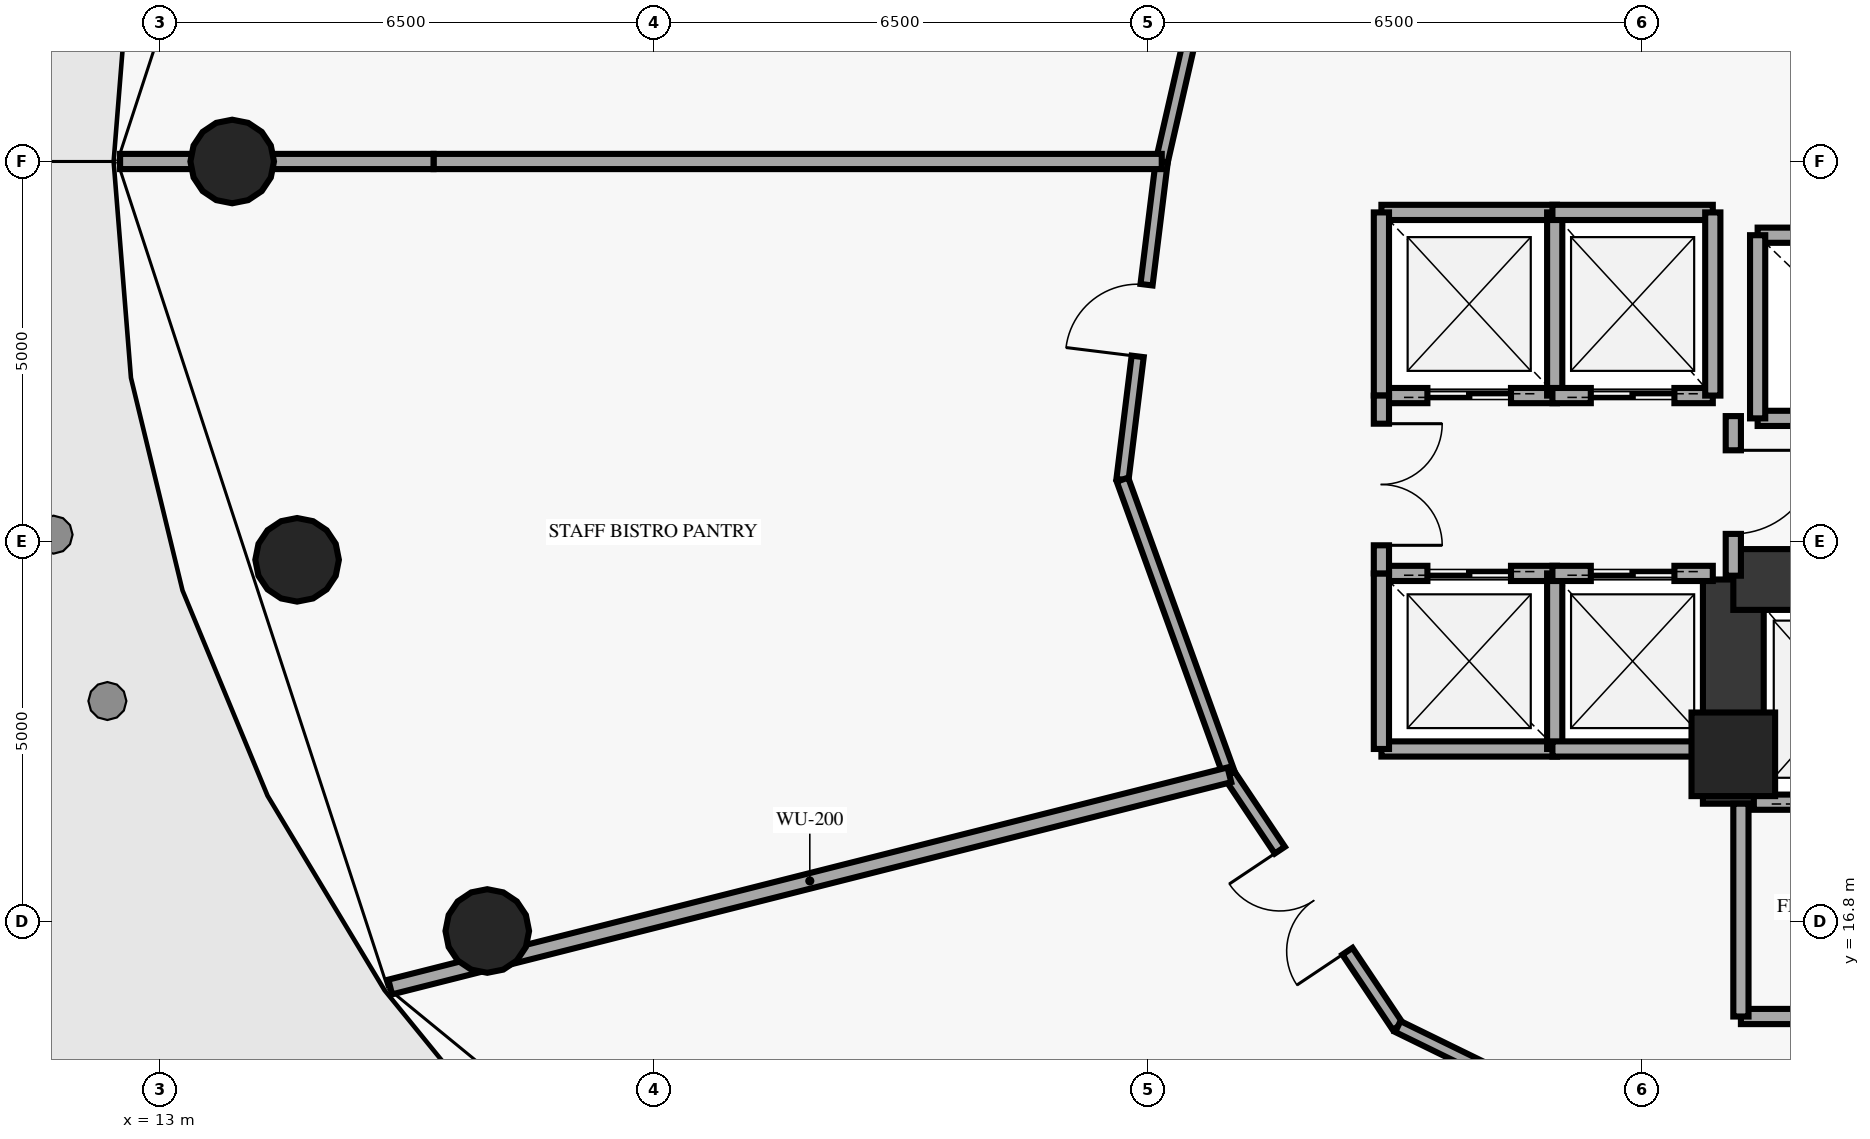
"""IFC4 building model, lengths in metres.
Left out: names, types, materials, properties, quantities, classifications, styles, units other than length and angle.
Written with IfcOpenShell. Run it as: python <this file> out.ifc"""

import sys

from ifc_helpers import new_model, si_unit, direction, frame, frame_2d, origin, origin_2d, place, context, subcontext, project, spatial, rectangle, circle, extrude, element, fill, save


model = new_model("IFC4")
c1 = context("Model", 3, precision=1e-05, world=origin(), true_north=direction((0.0, 1.0)))
c2 = subcontext(c1, "Body", "Model", "MODEL_VIEW")
j1 = project(units=[si_unit("LENGTHUNIT", "METRE"), si_unit("PLANEANGLEUNIT", "RADIAN")], contexts=[c1])
p1 = place(None, origin())
s1 = spatial("IfcSite", under=j1, at=p1, CompositionType="ELEMENT")
p2 = place(p1, origin())
s2 = spatial("IfcBuilding", under=s1, at=p2, CompositionType="ELEMENT")
p3 = place(p2, frame((0.0, 0.0, 21.0)))
s3 = spatial("IfcBuildingStorey", under=s2, at=p3, CompositionType="ELEMENT", Elevation=21.0)
p4 = place(p3, frame((33.7, 19.0, 0.0), z_axis=(0.0, 0.0, 1.0), x_axis=(1.0, 0.0, 0.0)))
e1 = element("IfcColumn", 1, at=p4, inside=s3, PredefinedType="PILASTER", context=c2, shape_type="SweptSolid", body=[
    extrude(rectangle(XDim=1.1, YDim=1.1, at=origin_2d()), origin(), (0.0, 0.0, 1.0), 3.79),
])
p5 = place(p3, frame((13.95, 26.8, 0.0), z_axis=(0.0, 0.0, 1.0), x_axis=(1.0, 0.0, 0.0)))
e2 = element("IfcColumn", 2, at=p5, inside=s3, PredefinedType="COLUMN", context=c2, shape_type="SweptSolid", body=[
    extrude(circle(Radius=0.55, at=origin_2d()), origin(), (0.0, 0.0, 1.0), 3.79),
])
for number, where, z_axis, x_axis in (
    (3, (14.804, 21.559, -0.26), (0.0, 0.0, 1.0), (1.0, 0.0, 0.0)),
    (4, (17.306, 16.675, -0.26), (0.0, 0.0, 1.0), (1.0, 0.0, 0.0)),
):
    element("IfcColumn", number, at=place(p3, frame(where, z_axis=z_axis, x_axis=x_axis)), inside=s3, PredefinedType="COLUMN", context=c2, shape_type="SweptSolid", body=[
        extrude(circle(Radius=0.55, at=origin_2d()), origin(), (0.0, 0.0, 1.0), 4.05),
    ])
p6 = place(p3, frame((33.7, 18.35, 0.0), z_axis=(0.0, 0.0, 1.0), x_axis=(0.0, 1.0, 0.0)))
e5 = element("IfcWall", 5, at=p6, inside=s3, PredefinedType="SHEAR", context=c2, shape_type="SweptSolid", body=[
    extrude(rectangle(XDim=2.95, YDim=0.8, at=frame_2d((1.475, 0.0))), origin(), (0.0, 0.0, 1.0), 3.79),
])
p7 = place(p3, frame((33.7, 21.3, 0.0), z_axis=(0.0, 0.0, 1.0), x_axis=(1.0, 0.0, 0.0)))
e6 = element("IfcWall", 6, at=p7, inside=s3, PredefinedType="SHEAR", context=c2, shape_type="SweptSolid", body=[
    extrude(rectangle(XDim=7.55, YDim=0.8, at=frame_2d((3.775, 0.0))), origin(), (0.0, 0.0, 1.0), 3.79),
])
p8 = place(p3, frame((10.811, 15.225, 0.0), z_axis=(0.0, 0.0, 1.0), x_axis=(0.733372632091, -0.679826876859, 0.0)))
e7 = element("IfcWall", 7, at=p8, inside=s3, PredefinedType="PARAPET", context=c2, shape_type="SweptSolid", body=[
    extrude(rectangle(XDim=7.053, YDim=0.24, at=frame_2d((3.527, 0.0))), origin(), (0.0, 0.0, 1.0), 1.15),
])
p9 = place(p3, frame((29.07, 23.72, 0.0), z_axis=(0.0, 0.0, 1.0), x_axis=(1.0, 0.0, 0.0)))
e8 = element("IfcWall", 8, at=p9, inside=s3, PredefinedType="SOLIDWALL", context=c2, shape_type="SweptSolid", body=[
    extrude(rectangle(XDim=2.31, YDim=0.2, at=frame_2d((1.155, 0.0))), origin(), (0.0, 0.0, 1.0), 3.79),
])
p10 = place(p9, frame((0.605, 0.0, 0.0)))
e9 = element("IfcOpeningElement", 9, at=p10, cuts=e8, PredefinedType="OPENING", context=c2, shape_type="SweptSolid", body=[
    extrude(rectangle(XDim=1.1, YDim=2.15, at=frame_2d((0.55, 1.075))), frame((0.0, 0.11, 0.0), z_axis=(0.0, -1.0, 0.0), x_axis=(1.0, 0.0, 0.0)), (0.0, 0.0, 1.0), 0.22),
])
p11 = place(p3, frame((29.07, 26.13, 0.0), z_axis=(0.0, 0.0, 1.0), x_axis=(1.0, 0.0, 0.0)))
e10 = element("IfcWall", 10, at=p11, inside=s3, PredefinedType="SOLIDWALL", context=c2, shape_type="SweptSolid", body=[
    extrude(rectangle(XDim=2.31, YDim=0.2, at=frame_2d((1.155, 0.0))), origin(), (0.0, 0.0, 1.0), 3.79),
])
for number, where, z_axis, x_axis in (
    (11, (29.07, 23.72, 0.0), (0.0, 0.0, 1.0), (0.0, 1.0, 0.0)),
    (12, (31.35, 23.72, 0.0), (0.0, 0.0, 1.0), (0.0, 1.0, 0.0)),
):
    element("IfcWall", number, at=place(p3, frame(where, z_axis=z_axis, x_axis=x_axis)), inside=s3, PredefinedType="SOLIDWALL", context=c2, shape_type="SweptSolid", body=[
        extrude(rectangle(XDim=2.41, YDim=0.2, at=frame_2d((1.205, 0.0))), origin(), (0.0, 0.0, 1.0), 3.79),
    ])
p12 = place(p3, frame((31.32, 23.72, 0.0), z_axis=(0.0, 0.0, 1.0), x_axis=(1.0, 0.0, 0.0)))
e13 = element("IfcWall", 13, at=p12, inside=s3, PredefinedType="SOLIDWALL", context=c2, shape_type="SweptSolid", body=[
    extrude(rectangle(XDim=2.11, YDim=0.2, at=frame_2d((1.055, 0.0))), origin(), (0.0, 0.0, 1.0), 3.79),
])
p13 = place(p12, frame((0.505, 0.0, 0.0)))
e14 = element("IfcOpeningElement", 14, at=p13, cuts=e13, PredefinedType="OPENING", context=c2, shape_type="SweptSolid", body=[
    extrude(rectangle(XDim=1.1, YDim=2.15, at=frame_2d((0.55, 1.075))), frame((0.0, 0.11, 0.0), z_axis=(0.0, -1.0, 0.0), x_axis=(1.0, 0.0, 0.0)), (0.0, 0.0, 1.0), 0.22),
])
p14 = place(p3, frame((31.32, 26.13, 0.0), z_axis=(0.0, 0.0, 1.0), x_axis=(1.0, 0.0, 0.0)))
e15 = element("IfcWall", 15, at=p14, inside=s3, PredefinedType="SOLIDWALL", context=c2, shape_type="SweptSolid", body=[
    extrude(rectangle(XDim=2.11, YDim=0.2, at=frame_2d((1.055, 0.0))), origin(), (0.0, 0.0, 1.0), 3.79),
])
p15 = place(p3, frame((33.43, 23.72, 0.0), z_axis=(0.0, 0.0, 1.0), x_axis=(0.0, 1.0, 0.0)))
e16 = element("IfcWall", 16, at=p15, inside=s3, PredefinedType="SOLIDWALL", context=c2, shape_type="SweptSolid", body=[
    extrude(rectangle(XDim=2.41, YDim=0.2, at=frame_2d((1.205, 0.0))), origin(), (0.0, 0.0, 1.0), 3.79),
])
p16 = place(p3, frame((29.07, 19.07, 0.0), z_axis=(0.0, 0.0, 1.0), x_axis=(1.0, 0.0, 0.0)))
e17 = element("IfcWall", 17, at=p16, inside=s3, PredefinedType="SOLIDWALL", context=c2, shape_type="SweptSolid", body=[
    extrude(rectangle(XDim=2.31, YDim=0.2, at=frame_2d((1.155, 0.0))), origin(), (0.0, 0.0, 1.0), 3.79),
])
p17 = place(p3, frame((29.07, 21.38, 0.0), z_axis=(0.0, 0.0, 1.0), x_axis=(1.0, 0.0, 0.0)))
e18 = element("IfcWall", 18, at=p17, inside=s3, PredefinedType="SOLIDWALL", context=c2, shape_type="SweptSolid", body=[
    extrude(rectangle(XDim=2.31, YDim=0.2, at=frame_2d((1.155, 0.0))), origin(), (0.0, 0.0, 1.0), 3.79),
])
p18 = place(p17, frame((0.605, 0.0, 0.0)))
e19 = element("IfcOpeningElement", 19, at=p18, cuts=e18, PredefinedType="OPENING", context=c2, shape_type="SweptSolid", body=[
    extrude(rectangle(XDim=1.1, YDim=2.15, at=frame_2d((0.55, 1.075))), frame((0.0, 0.11, 0.0), z_axis=(0.0, -1.0, 0.0), x_axis=(1.0, 0.0, 0.0)), (0.0, 0.0, 1.0), 0.22),
])
for number, where, z_axis, x_axis in (
    (20, (29.07, 19.07, 0.0), (0.0, 0.0, 1.0), (0.0, 1.0, 0.0)),
    (21, (31.35, 19.07, 0.0), (0.0, 0.0, 1.0), (0.0, 1.0, 0.0)),
):
    element("IfcWall", number, at=place(p3, frame(where, z_axis=z_axis, x_axis=x_axis)), inside=s3, PredefinedType="SOLIDWALL", context=c2, shape_type="SweptSolid", body=[
        extrude(rectangle(XDim=2.31, YDim=0.2, at=frame_2d((1.155, 0.0))), origin(), (0.0, 0.0, 1.0), 3.79),
    ])
p19 = place(p3, frame((31.32, 19.07, 0.0), z_axis=(0.0, 0.0, 1.0), x_axis=(1.0, 0.0, 0.0)))
e22 = element("IfcWall", 22, at=p19, inside=s3, PredefinedType="SOLIDWALL", context=c2, shape_type="SweptSolid", body=[
    extrude(rectangle(XDim=2.11, YDim=0.2, at=frame_2d((1.055, 0.0))), origin(), (0.0, 0.0, 1.0), 3.79),
])
p20 = place(p3, frame((31.32, 21.38, 0.0), z_axis=(0.0, 0.0, 1.0), x_axis=(1.0, 0.0, 0.0)))
e23 = element("IfcWall", 23, at=p20, inside=s3, PredefinedType="SOLIDWALL", context=c2, shape_type="SweptSolid", body=[
    extrude(rectangle(XDim=2.11, YDim=0.2, at=frame_2d((1.055, 0.0))), origin(), (0.0, 0.0, 1.0), 3.79),
])
p21 = place(p20, frame((0.505, 0.0, 0.0)))
e24 = element("IfcOpeningElement", 24, at=p21, cuts=e23, PredefinedType="OPENING", context=c2, shape_type="SweptSolid", body=[
    extrude(rectangle(XDim=1.1, YDim=2.15, at=frame_2d((0.55, 1.075))), frame((0.0, 0.11, 0.0), z_axis=(0.0, -1.0, 0.0), x_axis=(1.0, 0.0, 0.0)), (0.0, 0.0, 1.0), 0.22),
])
for number, where, z_axis, x_axis in (
    (25, (34.02, 23.42, 0.0), (0.0, 0.0, 1.0), (1.0, 0.0, 0.0)),
    (26, (34.02, 25.83, 0.0), (0.0, 0.0, 1.0), (1.0, 0.0, 0.0)),
):
    element("IfcWall", number, at=place(p3, frame(where, z_axis=z_axis, x_axis=x_axis)), inside=s3, PredefinedType="SOLIDWALL", context=c2, shape_type="SweptSolid", body=[
        extrude(rectangle(XDim=2.5, YDim=0.2, at=frame_2d((1.25, 0.0))), origin(), (0.0, 0.0, 1.0), 3.79),
    ])
p22 = place(p3, frame((34.02, 23.42, 0.0), z_axis=(0.0, 0.0, 1.0), x_axis=(0.0, 1.0, 0.0)))
e27 = element("IfcWall", 27, at=p22, inside=s3, PredefinedType="SOLIDWALL", context=c2, shape_type="SweptSolid", body=[
    extrude(rectangle(XDim=2.41, YDim=0.2, at=frame_2d((1.205, 0.0))), origin(), (0.0, 0.0, 1.0), 3.79),
])
p23 = place(p3, frame((33.97, 18.37, 0.0), z_axis=(0.0, 0.0, 1.0), x_axis=(1.0, 0.0, 0.0)))
e28 = element("IfcWall", 28, at=p23, inside=s3, PredefinedType="SOLIDWALL", context=c2, shape_type="SweptSolid", body=[
    extrude(rectangle(XDim=2.36, YDim=0.2, at=frame_2d((1.18, 0.0))), origin(), (0.0, 0.0, 1.0), 3.79),
])
p24 = place(p23, frame((0.555, 0.0, 0.0)))
e29 = element("IfcOpeningElement", 29, at=p24, cuts=e28, PredefinedType="OPENING", context=c2, shape_type="SweptSolid", body=[
    extrude(rectangle(XDim=1.25, YDim=2.2, at=frame_2d((0.625, 1.1))), frame((0.0, 0.11, 0.0), z_axis=(0.0, -1.0, 0.0), x_axis=(1.0, 0.0, 0.0)), (0.0, 0.0, 1.0), 0.22),
])
p25 = place(p3, frame((29.07, 21.38, 0.0), z_axis=(0.0, 0.0, 1.0), x_axis=(0.0, 1.0, 0.0)))
e30 = element("IfcWall", 30, at=p25, inside=s3, PredefinedType="SOLIDWALL", context=c2, shape_type="SweptSolid", body=[
    extrude(rectangle(XDim=2.34, YDim=0.2, at=frame_2d((1.17, 0.0))), origin(), (0.0, 0.0, 1.0), 3.79),
])
p26 = place(p25, frame((0.37, 0.0, 0.0)))
e31 = element("IfcOpeningElement", 31, at=p26, cuts=e30, PredefinedType="OPENING", context=c2, shape_type="SweptSolid", body=[
    extrude(rectangle(XDim=1.6, YDim=2.2, at=frame_2d((0.8, 1.1))), frame((0.0, 0.11, 0.0), z_axis=(0.0, -1.0, 0.0), x_axis=(1.0, 0.0, 0.0)), (0.0, 0.0, 1.0), 0.22),
])
p27 = place(p3, frame((33.7, 21.35, 0.0), z_axis=(0.0, 0.0, 1.0), x_axis=(0.0, 1.0, 0.0)))
e32 = element("IfcWall", 32, at=p27, inside=s3, PredefinedType="SOLIDWALL", context=c2, shape_type="SweptSolid", body=[
    extrude(rectangle(XDim=2.1, YDim=0.2, at=frame_2d((1.05, 0.0))), origin(), (0.0, 0.0, 1.0), 3.01),
])
p28 = place(p27, frame((0.55, 0.0, 0.0)))
e33 = element("IfcOpeningElement", 33, at=p28, cuts=e32, PredefinedType="OPENING", context=c2, shape_type="SweptSolid", body=[
    extrude(rectangle(XDim=1.1, YDim=2.15, at=frame_2d((0.55, 1.075))), frame((0.0, 0.11, 0.0), z_axis=(0.0, -1.0, 0.0), x_axis=(1.0, 0.0, 0.0)), (0.0, 0.0, 1.0), 0.22),
])
p29 = place(p3, frame((33.8, 15.55, 0.0), z_axis=(0.0, 0.0, 1.0), x_axis=(1.0, 0.0, 0.0)))
e34 = element("IfcWall", 34, at=p29, inside=s3, PredefinedType="SOLIDWALL", context=c2, shape_type="SweptSolid", body=[
    extrude(rectangle(XDim=7.55, YDim=0.2, at=frame_2d((3.775, 0.0))), origin(), (0.0, 0.0, 1.0), 3.79),
])
p30 = place(p3, frame((33.8, 15.55, 0.0), z_axis=(0.0, 0.0, 1.0), x_axis=(0.0, 1.0, 0.0)))
e35 = element("IfcWall", 35, at=p30, inside=s3, PredefinedType="SOLIDWALL", context=c2, shape_type="SweptSolid", body=[
    extrude(rectangle(XDim=2.8, YDim=0.2, at=frame_2d((1.4, 0.0))), origin(), (0.0, 0.0, 1.0), 3.79),
])
p31 = place(p3, frame((27.898, 34.31, 0.0), z_axis=(0.0, 0.0, 1.0), x_axis=(-0.223002916051, -0.974817777553, 0.0)))
e36 = element("IfcWall", 36, at=p31, inside=s3, PredefinedType="PARTITIONING", context=c2, shape_type="SweptSolid", body=[
    extrude(rectangle(XDim=7.704, YDim=0.16, at=frame_2d((3.852, 0.0))), origin(), (0.0, 0.0, 1.0), 3.79),
])
p32 = place(p3, frame((25.663, 22.614, 0.0), z_axis=(0.0, 0.0, 1.0), x_axis=(0.122538537921, 0.992463755874, 0.0)))
e37 = element("IfcWall", 37, at=p32, inside=s3, PredefinedType="PARTITIONING", context=c2, shape_type="SweptSolid", body=[
    extrude(rectangle(XDim=4.218, YDim=0.16, at=frame_2d((2.109, 0.0))), origin(), (0.0, 0.0, 1.0), 3.79),
])
p33 = place(p32, frame((1.634, 0.0, 0.0)))
e38 = element("IfcOpeningElement", 38, at=p33, cuts=e37, PredefinedType="OPENING", context=c2, shape_type="SweptSolid", body=[
    extrude(rectangle(XDim=0.95, YDim=2.15, at=frame_2d((0.475, 1.075))), frame((0.0, 0.09, 0.0), z_axis=(0.0, -1.0, 0.0), x_axis=(1.0, 0.0, 0.0)), (0.0, 0.0, 1.0), 0.18),
])
p34 = place(p3, frame((25.663, 22.614, 0.0), z_axis=(0.0, 0.0, 1.0), x_axis=(0.34058972089, -0.940212019719, 0.0)))
e39 = element("IfcWall", 39, at=p34, inside=s3, PredefinedType="PARTITIONING", context=c2, shape_type="SweptSolid", body=[
    extrude(rectangle(XDim=4.131, YDim=0.16, at=frame_2d((2.065, 0.0))), origin(), (0.0, 0.0, 1.0), 3.79),
])
p35 = place(p3, frame((29.286, 15.418, 0.0), z_axis=(0.0, 0.0, 1.0), x_axis=(-0.556056751682, 0.831144324958, 0.0)))
e40 = element("IfcWall", 40, at=p35, inside=s3, PredefinedType="PARTITIONING", context=c2, shape_type="SweptSolid", body=[
    extrude(rectangle(XDim=3.985, YDim=0.16, at=frame_2d((1.992, 0.0))), origin(), (0.0, 0.0, 1.0), 3.79),
])
p36 = place(p35, frame((1.192, 0.0, 0.0)))
e41 = element("IfcOpeningElement", 41, at=p36, cuts=e40, PredefinedType="OPENING", context=c2, shape_type="SweptSolid", body=[
    extrude(rectangle(XDim=1.6, YDim=2.2, at=frame_2d((0.8, 1.1))), frame((0.0, 0.09, 0.0), z_axis=(0.0, -1.0, 0.0), x_axis=(1.0, 0.0, 0.0)), (0.0, 0.0, 1.0), 0.18),
])
p37 = place(p3, frame((29.286, 15.418, 0.0), z_axis=(0.0, 0.0, 1.0), x_axis=(0.898437278598, -0.439101874768, 0.0)))
e42 = element("IfcWall", 42, at=p37, inside=s3, PredefinedType="PARTITIONING", context=c2, shape_type="SweptSolid", body=[
    extrude(rectangle(XDim=7.119, YDim=0.16, at=frame_2d((3.56, 0.0))), origin(), (0.0, 0.0, 1.0), 3.79),
])
p38 = place(p3, frame((26.18, 26.8, 0.0), z_axis=(0.0, 0.0, 1.0), x_axis=(-1.0, 0.0, 0.0)))
e43 = element("IfcWall", 43, at=p38, inside=s3, PredefinedType="PARTITIONING", context=c2, shape_type="SweptSolid", body=[
    extrude(rectangle(XDim=9.581, YDim=0.2, at=frame_2d((4.791, 0.0))), origin(), (0.0, 0.0, 1.0), 3.79),
])
p39 = place(p3, frame((16.599, 26.8, 0.0), z_axis=(0.0, 0.0, 1.0), x_axis=(-1.0, 0.0, 0.0)))
e44 = element("IfcWall", 44, at=p39, inside=s3, PredefinedType="PARTITIONING", context=c2, shape_type="SweptSolid", body=[
    extrude(rectangle(XDim=2.66, YDim=0.2, at=frame_2d((1.33, 0.0))), origin(), (0.0, 0.0, 1.0), 2.78),
])
p40 = place(p3, frame((13.939, 26.8, 0.0), z_axis=(0.0, 0.0, 1.0), x_axis=(-1.0, 0.0, 0.0)))
e45 = element("IfcWall", 45, at=p40, inside=s3, PredefinedType="PARTITIONING", context=c2, shape_type="SweptSolid", body=[
    extrude(rectangle(XDim=1.464, YDim=0.2, at=frame_2d((0.732, 0.0))), origin(), (0.0, 0.0, 1.0), 3.79),
])
p41 = place(p3, frame((27.07, 18.73, 0.0), z_axis=(0.0, 0.0, 1.0), x_axis=(-0.969483223358, -0.245157662797, 0.0)))
e46 = element("IfcWall", 46, at=p41, inside=s3, PredefinedType="PARTITIONING", context=c2, shape_type="SweptSolid", body=[
    extrude(rectangle(XDim=11.389, YDim=0.2, at=frame_2d((5.694, 0.0))), origin(), (0.0, 0.0, 1.0), 3.79),
])
p42 = place(p10, origin())
e47 = element("IfcDoor", 47, at=p42, inside=s3, OperationType="DOUBLE_DOOR_SLIDING", PredefinedType="DOOR", context=c2, shape_type="SweptSolid", body=[
    extrude(rectangle(XDim=1.1, YDim=2.15, at=frame_2d((0.55, 1.075))), frame((0.0, 0.025, 0.0), z_axis=(0.0, -1.0, 0.0), x_axis=(1.0, 0.0, 0.0)), (0.0, 0.0, 1.0), 0.05),
])
fill(e9, e47)
p43 = place(p13, origin())
e48 = element("IfcDoor", 48, at=p43, inside=s3, OperationType="DOUBLE_DOOR_SLIDING", PredefinedType="DOOR", context=c2, shape_type="SweptSolid", body=[
    extrude(rectangle(XDim=1.1, YDim=2.15, at=frame_2d((0.55, 1.075))), frame((0.0, 0.025, 0.0), z_axis=(0.0, -1.0, 0.0), x_axis=(1.0, 0.0, 0.0)), (0.0, 0.0, 1.0), 0.05),
])
fill(e14, e48)
p44 = place(p18, origin())
e49 = element("IfcDoor", 49, at=p44, inside=s3, OperationType="DOUBLE_DOOR_SLIDING", PredefinedType="DOOR", context=c2, shape_type="SweptSolid", body=[
    extrude(rectangle(XDim=1.1, YDim=2.15, at=frame_2d((0.55, 1.075))), frame((0.0, 0.025, 0.0), z_axis=(0.0, -1.0, 0.0), x_axis=(1.0, 0.0, 0.0)), (0.0, 0.0, 1.0), 0.05),
])
fill(e19, e49)
p45 = place(p21, origin())
e50 = element("IfcDoor", 50, at=p45, inside=s3, OperationType="DOUBLE_DOOR_SLIDING", PredefinedType="DOOR", context=c2, shape_type="SweptSolid", body=[
    extrude(rectangle(XDim=1.1, YDim=2.15, at=frame_2d((0.55, 1.075))), frame((0.0, 0.025, 0.0), z_axis=(0.0, -1.0, 0.0), x_axis=(1.0, 0.0, 0.0)), (0.0, 0.0, 1.0), 0.05),
])
fill(e24, e50)
p46 = place(p26, origin())
e51 = element("IfcDoor", 51, at=p46, inside=s3, OperationType="DOUBLE_DOOR_SINGLE_SWING", PredefinedType="DOOR", context=c2, shape_type="SweptSolid", body=[
    extrude(rectangle(XDim=1.6, YDim=2.2, at=frame_2d((0.8, 1.1))), frame((0.0, 0.025, 0.0), z_axis=(0.0, -1.0, 0.0), x_axis=(1.0, 0.0, 0.0)), (0.0, 0.0, 1.0), 0.05),
])
fill(e31, e51)
p47 = place(p28, origin())
e52 = element("IfcDoor", 52, at=p47, inside=s3, OperationType="SINGLE_SWING_RIGHT", PredefinedType="DOOR", context=c2, shape_type="SweptSolid", body=[
    extrude(rectangle(XDim=1.1, YDim=2.15, at=frame_2d((0.55, 1.075))), frame((0.0, 0.025, 0.0), z_axis=(0.0, -1.0, 0.0), x_axis=(1.0, 0.0, 0.0)), (0.0, 0.0, 1.0), 0.05),
])
fill(e33, e52)
p48 = place(p33, origin())
e53 = element("IfcDoor", 53, at=p48, inside=s3, OperationType="SINGLE_SWING_LEFT", PredefinedType="DOOR", context=c2, shape_type="SweptSolid", body=[
    extrude(rectangle(XDim=0.95, YDim=2.15, at=frame_2d((0.475, 1.075))), frame((0.0, 0.025, 0.0), z_axis=(0.0, -1.0, 0.0), x_axis=(1.0, 0.0, 0.0)), (0.0, 0.0, 1.0), 0.05),
])
fill(e38, e53)
p49 = place(p36, origin())
e54 = element("IfcDoor", 54, at=p49, inside=s3, OperationType="DOUBLE_DOOR_SINGLE_SWING", PredefinedType="DOOR", context=c2, shape_type="SweptSolid", body=[
    extrude(rectangle(XDim=1.6, YDim=2.2, at=frame_2d((0.8, 1.1))), frame((0.0, 0.025, 0.0), z_axis=(0.0, -1.0, 0.0), x_axis=(1.0, 0.0, 0.0)), (0.0, 0.0, 1.0), 0.05),
])
fill(e41, e54)
save(model, sys.argv[1])
